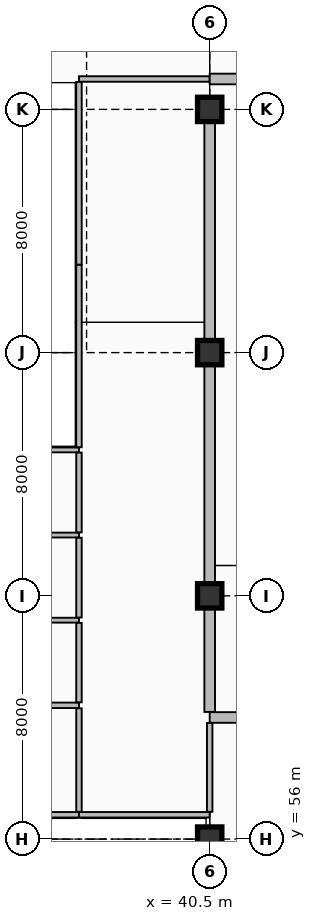
"""IFC4 building model, lengths in metres.
Left out: names, types, materials, properties, quantities, classifications, styles, units other than length and angle.
Written with IfcOpenShell. Run it as: python <this file> out.ifc"""

import sys

from ifc_helpers import new_model, si_unit, direction, frame, frame_2d, origin, origin_2d, place, context, subcontext, project, spatial, rectangle, extrude, element, fill, save


model = new_model("IFC4")
c1 = context("Model", 3, precision=1e-05, world=origin(), true_north=direction((0.0, 1.0)))
c2 = subcontext(c1, "Body", "Model", "MODEL_VIEW")
j1 = project(units=[si_unit("LENGTHUNIT", "METRE"), si_unit("PLANEANGLEUNIT", "RADIAN")], contexts=[c1])
p1 = place(None, origin())
s1 = spatial("IfcSite", under=j1, at=p1, CompositionType="ELEMENT")
p2 = place(p1, origin())
s2 = spatial("IfcBuilding", under=s1, at=p2, CompositionType="ELEMENT")
p3 = place(p2, frame((0.0, 0.0, -4.8)))
s3 = spatial("IfcBuildingStorey", under=s2, at=p3, CompositionType="ELEMENT", Elevation=-4.8)
for number, where, z_axis, x_axis in (
    (1, (40.5, 56.0, 0.0), (0.0, 0.0, 1.0), (1.0, 0.0, 0.0)),
    (2, (40.5, 64.0, 0.0), (0.0, 0.0, 1.0), (1.0, 0.0, 0.0)),
    (3, (40.5, 72.0, 0.0), (0.0, 0.0, 1.0), (1.0, 0.0, 0.0)),
    (4, (40.5, 80.0, 0.0), (0.0, 0.0, 1.0), (1.0, 0.0, 0.0)),
):
    element("IfcColumn", number, at=place(p3, frame(where, z_axis=z_axis, x_axis=x_axis)), inside=s3, PredefinedType="COLUMN", context=c2, shape_type="SweptSolid", body=[
        extrude(rectangle(XDim=0.8, YDim=0.8, at=origin_2d()), origin(), (0.0, 0.0, 1.0), 4.8),
    ])
p4 = place(p3, frame((31.8, 56.8, 0.0), z_axis=(0.0, 0.0, 1.0), x_axis=(1.0, 0.0, 0.0)))
e5 = element("IfcWall", 5, at=p4, inside=s3, PredefinedType="PARTITIONING", context=c2, shape_type="SweptSolid", body=[
    extrude(rectangle(XDim=4.4, YDim=0.18, at=frame_2d((2.2, 0.0))), origin(), (0.0, 0.0, 1.0), 4.45),
])
p5 = place(p3, frame((32.1, 60.4, 0.0), z_axis=(0.0, 0.0, 1.0), x_axis=(1.0, 0.0, 0.0)))
e6 = element("IfcWall", 6, at=p5, inside=s3, PredefinedType="PARTITIONING", context=c2, shape_type="SweptSolid", body=[
    extrude(rectangle(XDim=4.1, YDim=0.18, at=frame_2d((2.05, 0.0))), origin(), (0.0, 0.0, 1.0), 4.45),
])
for number, where, z_axis, x_axis in (
    (7, (32.108, 63.2, 0.0), (0.0, 0.0, 1.0), (1.0, 0.0, 0.0)),
    (8, (32.108, 66.0, 0.0), (0.0, 0.0, 1.0), (1.0, 0.0, 0.0)),
):
    element("IfcWall", number, at=place(p3, frame(where, z_axis=z_axis, x_axis=x_axis)), inside=s3, PredefinedType="PARTITIONING", context=c2, shape_type="SweptSolid", body=[
        extrude(rectangle(XDim=4.092, YDim=0.16, at=frame_2d((2.046, 0.0))), origin(), (0.0, 0.0, 1.0), 4.45),
    ])
p6 = place(p3, frame((32.1, 68.8, 0.0), z_axis=(0.0, 0.0, 1.0), x_axis=(1.0, 0.0, 0.0)))
e9 = element("IfcWall", 9, at=p6, inside=s3, PredefinedType="PARTITIONING", context=c2, shape_type="SweptSolid", body=[
    extrude(rectangle(XDim=4.1, YDim=0.16, at=frame_2d((2.05, 0.0))), origin(), (0.0, 0.0, 1.0), 4.45),
])
p7 = place(p3, frame((36.2, 56.8, 0.0), z_axis=(0.0, 0.0, 1.0), x_axis=(1.0, 0.0, 0.0)))
e10 = element("IfcWall", 10, at=p7, inside=s3, PredefinedType="PARTITIONING", context=c2, shape_type="SweptSolid", body=[
    extrude(rectangle(XDim=4.3, YDim=0.18, at=frame_2d((2.15, 0.0))), origin(), (0.0, 0.0, 1.0), 4.45),
])
p8 = place(p3, frame((36.2, 81.0, 0.0), z_axis=(0.0, 0.0, 1.0), x_axis=(1.0, 0.0, 0.0)))
e11 = element("IfcWall", 11, at=p8, inside=s3, PredefinedType="PARTITIONING", context=c2, shape_type="SweptSolid", body=[
    extrude(rectangle(XDim=4.3, YDim=0.18, at=frame_2d((2.15, 0.0))), origin(), (0.0, 0.0, 1.0), 4.45),
])
p9 = place(p8, frame((1.55, 0.0, 0.0)))
e12 = element("IfcOpeningElement", 12, at=p9, cuts=e11, PredefinedType="OPENING", context=c2, shape_type="SweptSolid", body=[
    extrude(rectangle(XDim=1.2, YDim=2.2, at=frame_2d((0.6, 1.1))), frame((0.0, 0.1, 0.0), z_axis=(0.0, -1.0, 0.0), x_axis=(1.0, 0.0, 0.0)), (0.0, 0.0, 1.0), 0.2),
])
p10 = place(p3, frame((40.5, 60.0, 0.0), z_axis=(0.0, 0.0, 1.0), x_axis=(1.0, 0.0, 0.0)))
e13 = element("IfcWall", 13, at=p10, inside=s3, PredefinedType="SOLIDWALL", context=c2, shape_type="SweptSolid", body=[
    extrude(rectangle(XDim=6.075, YDim=0.35, at=frame_2d((3.038, 0.0))), origin(), (0.0, 0.0, 1.0), 4.45),
])
p11 = place(p3, frame((40.5, 81.0, 0.0), z_axis=(0.0, 0.0, 1.0), x_axis=(1.0, 0.0, 0.0)))
e14 = element("IfcWall", 14, at=p11, inside=s3, PredefinedType="SOLIDWALL", context=c2, shape_type="SweptSolid", body=[
    extrude(rectangle(XDim=24.3, YDim=0.35, at=frame_2d((12.15, 0.0))), origin(), (0.0, 0.0, 1.0), 4.45),
])
p12 = place(p11, frame((11.6, 0.0, 0.0)))
e15 = element("IfcOpeningElement", 15, at=p12, cuts=e14, PredefinedType="OPENING", context=c2, shape_type="SweptSolid", body=[
    extrude(rectangle(XDim=1.1, YDim=2.25, at=frame_2d((0.55, 1.125))), frame((0.0, 0.185, 0.0), z_axis=(0.0, -1.0, 0.0), x_axis=(1.0, 0.0, 0.0)), (0.0, 0.0, 1.0), 0.37),
])
p13 = place(p3, frame((36.2, 56.898, 0.0), z_axis=(0.0, 0.0, 1.0), x_axis=(0.0, 1.0, 0.0)))
e16 = element("IfcWall", 16, at=p13, inside=s3, PredefinedType="PARTITIONING", context=c2, shape_type="SweptSolid", body=[
    extrude(rectangle(XDim=3.404, YDim=0.18, at=frame_2d((1.702, 0.0))), origin(), (0.0, 0.0, 1.0), 4.45),
])
p14 = place(p13, frame((1.202, 0.0, 0.0)))
e17 = element("IfcOpeningElement", 17, at=p14, cuts=e16, PredefinedType="OPENING", context=c2, shape_type="SweptSolid", body=[
    extrude(rectangle(XDim=1.0, YDim=2.15, at=frame_2d((0.5, 1.075))), frame((0.0, 0.1, 0.0), z_axis=(0.0, -1.0, 0.0), x_axis=(1.0, 0.0, 0.0)), (0.0, 0.0, 1.0), 0.2),
])
p15 = place(p3, frame((36.2, 60.498, 0.0), z_axis=(0.0, 0.0, 1.0), x_axis=(0.0, 1.0, 0.0)))
e18 = element("IfcWall", 18, at=p15, inside=s3, PredefinedType="PARTITIONING", context=c2, shape_type="SweptSolid", body=[
    extrude(rectangle(XDim=2.614, YDim=0.18, at=frame_2d((1.307, 0.0))), origin(), (0.0, 0.0, 1.0), 4.45),
])
p16 = place(p15, frame((0.832, 0.0, 0.0)))
e19 = element("IfcOpeningElement", 19, at=p16, cuts=e18, PredefinedType="OPENING", context=c2, shape_type="SweptSolid", body=[
    extrude(rectangle(XDim=0.95, YDim=2.1, at=frame_2d((0.475, 1.05))), frame((0.0, 0.1, 0.0), z_axis=(0.0, -1.0, 0.0), x_axis=(1.0, 0.0, 0.0)), (0.0, 0.0, 1.0), 0.2),
])
p17 = place(p3, frame((36.2, 63.288, 0.0), z_axis=(0.0, 0.0, 1.0), x_axis=(0.0, 1.0, 0.0)))
e20 = element("IfcWall", 20, at=p17, inside=s3, PredefinedType="PARTITIONING", context=c2, shape_type="SweptSolid", body=[
    extrude(rectangle(XDim=2.624, YDim=0.18, at=frame_2d((1.312, 0.0))), origin(), (0.0, 0.0, 1.0), 4.45),
])
p18 = place(p17, frame((0.837, 0.0, 0.0)))
e21 = element("IfcOpeningElement", 21, at=p18, cuts=e20, PredefinedType="OPENING", context=c2, shape_type="SweptSolid", body=[
    extrude(rectangle(XDim=0.95, YDim=2.1, at=frame_2d((0.475, 1.05))), frame((0.0, 0.1, 0.0), z_axis=(0.0, -1.0, 0.0), x_axis=(1.0, 0.0, 0.0)), (0.0, 0.0, 1.0), 0.2),
])
p19 = place(p3, frame((36.2, 66.088, 0.0), z_axis=(0.0, 0.0, 1.0), x_axis=(0.0, 1.0, 0.0)))
e22 = element("IfcWall", 22, at=p19, inside=s3, PredefinedType="PARTITIONING", context=c2, shape_type="SweptSolid", body=[
    extrude(rectangle(XDim=2.624, YDim=0.18, at=frame_2d((1.312, 0.0))), origin(), (0.0, 0.0, 1.0), 4.45),
])
p20 = place(p19, frame((0.812, 0.0, 0.0)))
e23 = element("IfcOpeningElement", 23, at=p20, cuts=e22, PredefinedType="OPENING", context=c2, shape_type="SweptSolid", body=[
    extrude(rectangle(XDim=1.0, YDim=2.15, at=frame_2d((0.5, 1.075))), frame((0.0, 0.1, 0.0), z_axis=(0.0, -1.0, 0.0), x_axis=(1.0, 0.0, 0.0)), (0.0, 0.0, 1.0), 0.2),
])
for number, where, z_axis, x_axis in (
    (24, (36.2, 68.888, 0.0), (0.0, 0.0, 1.0), (0.0, 1.0, 0.0)),
    (25, (36.2, 74.895, 0.0), (0.0, 0.0, 1.0), (0.0, 1.0, 0.0)),
):
    element("IfcWall", number, at=place(p3, frame(where, z_axis=z_axis, x_axis=x_axis)), inside=s3, PredefinedType="PARTITIONING", context=c2, shape_type="SweptSolid", body=[
        extrude(rectangle(XDim=6.007, YDim=0.18, at=frame_2d((3.003, 0.0))), origin(), (0.0, 0.0, 1.0), 4.035),
    ])
p21 = place(p3, frame((40.5, 56.898, 0.0), z_axis=(0.0, 0.0, 1.0), x_axis=(0.0, 1.0, 0.0)))
e26 = element("IfcWall", 26, at=p21, inside=s3, PredefinedType="PARTITIONING", context=c2, shape_type="SweptSolid", body=[
    extrude(rectangle(XDim=2.919, YDim=0.18, at=frame_2d((1.459, 0.0))), origin(), (0.0, 0.0, 1.0), 3.692),
])
p22 = place(p3, frame((40.5, 60.183, 0.0), z_axis=(0.0, 0.0, 1.0), x_axis=(0.0, 1.0, 0.0)))
e27 = element("IfcWall", 27, at=p22, inside=s3, PredefinedType="SOLIDWALL", context=c2, shape_type="SweptSolid", body=[
    extrude(rectangle(XDim=3.409, YDim=0.35, at=frame_2d((1.705, 0.0))), origin(), (0.0, 0.0, 1.0), 3.692),
])
for number, where, z_axis, x_axis in (
    (28, (40.5, 64.408, 0.0), (0.0, 0.0, 1.0), (0.0, 1.0, 0.0)),
    (29, (40.5, 72.408, 0.0), (0.0, 0.0, 1.0), (0.0, 1.0, 0.0)),
):
    element("IfcWall", number, at=place(p3, frame(where, z_axis=z_axis, x_axis=x_axis)), inside=s3, PredefinedType="SOLIDWALL", context=c2, shape_type="SweptSolid", body=[
        extrude(rectangle(XDim=7.184, YDim=0.35, at=frame_2d((3.592, 0.0))), origin(), (0.0, 0.0, 1.0), 3.692),
    ])
p23 = place(p9, frame((1.2, 0.0, 0.0), z_axis=(0.0, 0.0, 1.0), x_axis=(-1.0, 0.0, 0.0)))
e30 = element("IfcDoor", 30, at=p23, inside=s3, OperationType="SINGLE_SWING_LEFT", PredefinedType="DOOR", context=c2, shape_type="SweptSolid", body=[
    extrude(rectangle(XDim=1.2, YDim=2.2, at=frame_2d((0.6, 1.1))), frame((0.0, 0.025, 0.0), z_axis=(0.0, -1.0, 0.0), x_axis=(1.0, 0.0, 0.0)), (0.0, 0.0, 1.0), 0.05),
])
fill(e12, e30)
p24 = place(p14, origin())
e31 = element("IfcDoor", 31, at=p24, inside=s3, OperationType="SINGLE_SWING_RIGHT", PredefinedType="DOOR", context=c2, shape_type="SweptSolid", body=[
    extrude(rectangle(XDim=1.0, YDim=2.15, at=frame_2d((0.5, 1.075))), frame((0.0, 0.025, 0.0), z_axis=(0.0, -1.0, 0.0), x_axis=(1.0, 0.0, 0.0)), (0.0, 0.0, 1.0), 0.05),
])
fill(e17, e31)
p25 = place(p16, origin())
e32 = element("IfcDoor", 32, at=p25, inside=s3, OperationType="SINGLE_SWING_LEFT", PredefinedType="DOOR", context=c2, shape_type="SweptSolid", body=[
    extrude(rectangle(XDim=0.95, YDim=2.1, at=frame_2d((0.475, 1.05))), frame((0.0, 0.025, 0.0), z_axis=(0.0, -1.0, 0.0), x_axis=(1.0, 0.0, 0.0)), (0.0, 0.0, 1.0), 0.05),
])
fill(e19, e32)
p26 = place(p18, origin())
e33 = element("IfcDoor", 33, at=p26, inside=s3, OperationType="SINGLE_SWING_RIGHT", PredefinedType="DOOR", context=c2, shape_type="SweptSolid", body=[
    extrude(rectangle(XDim=0.95, YDim=2.1, at=frame_2d((0.475, 1.05))), frame((0.0, 0.025, 0.0), z_axis=(0.0, -1.0, 0.0), x_axis=(1.0, 0.0, 0.0)), (0.0, 0.0, 1.0), 0.05),
])
fill(e21, e33)
p27 = place(p20, origin())
e34 = element("IfcDoor", 34, at=p27, inside=s3, OperationType="SINGLE_SWING_LEFT", PredefinedType="DOOR", context=c2, shape_type="SweptSolid", body=[
    extrude(rectangle(XDim=1.0, YDim=2.15, at=frame_2d((0.5, 1.075))), frame((0.0, 0.025, 0.0), z_axis=(0.0, -1.0, 0.0), x_axis=(1.0, 0.0, 0.0)), (0.0, 0.0, 1.0), 0.05),
])
fill(e23, e34)
save(model, sys.argv[1])
